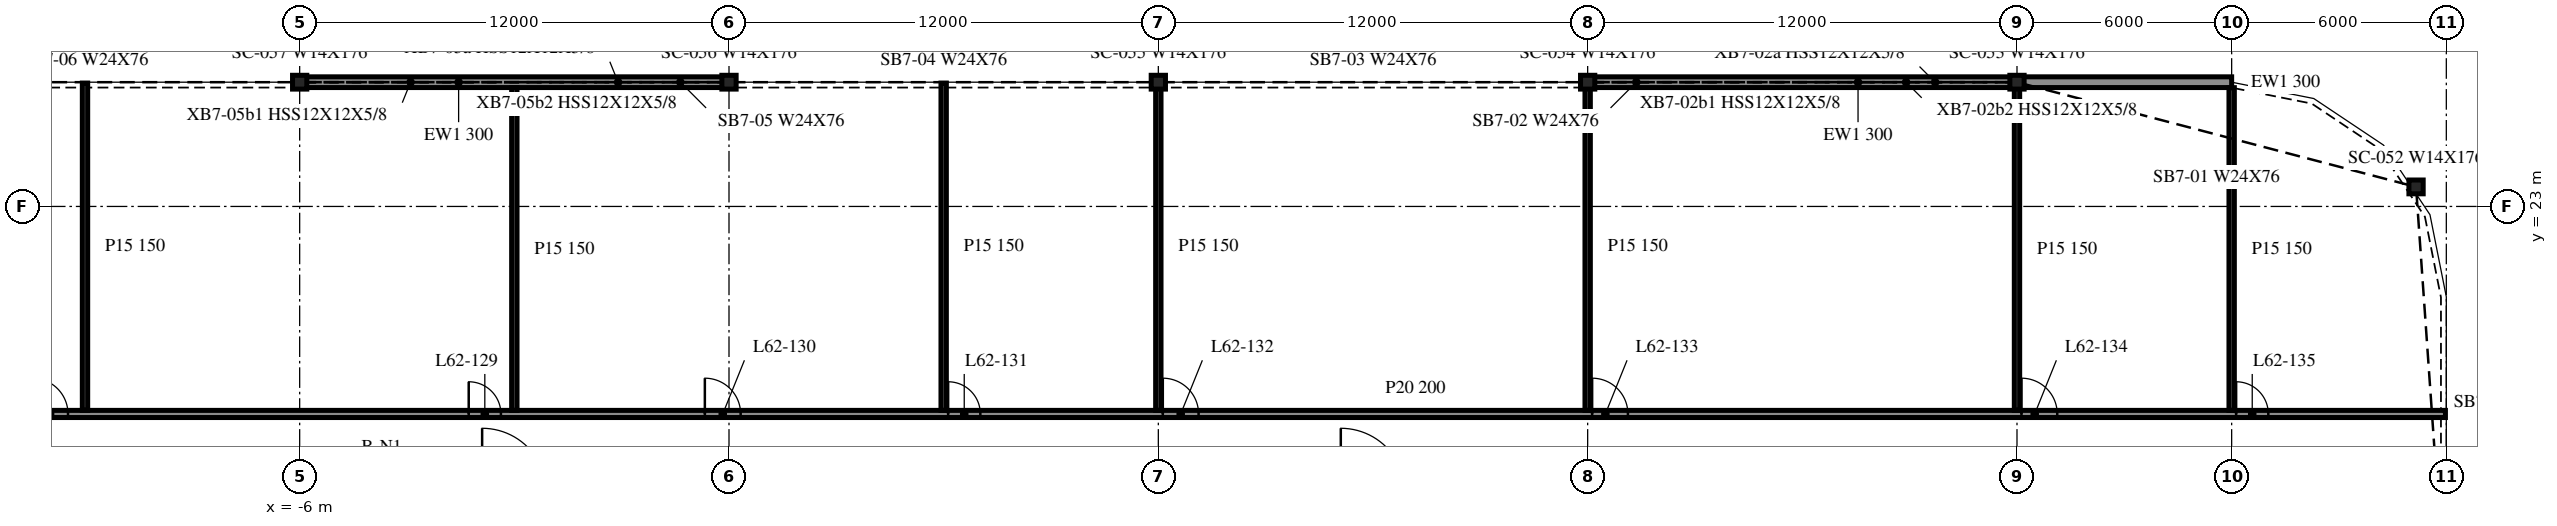
"""IFC4 building model, lengths in metres.
Left out: names, types, materials, properties, quantities, classifications, styles, units other than length and angle.
Written with IfcOpenShell. Run it as: python <this file> out.ifc"""

import sys

from ifc_helpers import new_model, si_unit, direction, frame, frame_2d, origin, origin_2d, place, context, subcontext, project, spatial, rectangle, i_section, extrude, element, fill, save


model = new_model("IFC4")
c1 = context("Model", 3, precision=1e-05, world=origin(), true_north=direction((0.0, 1.0)))
c2 = subcontext(c1, "Body", "Model", "MODEL_VIEW")
j1 = project(units=[si_unit("LENGTHUNIT", "METRE"), si_unit("PLANEANGLEUNIT", "RADIAN")], contexts=[c1])
p1 = place(None, origin())
s1 = spatial("IfcSite", under=j1, at=p1, CompositionType="ELEMENT")
p2 = place(p1, origin())
s2 = spatial("IfcBuilding", under=s1, at=p2, CompositionType="ELEMENT")
p3 = place(p2, frame((0.0, 0.0, 255.2)))
s3 = spatial("IfcBuildingStorey", under=s2, at=p3, CompositionType="ELEMENT", Elevation=255.2)
for number, where, z_axis, x_axis in (
    (1, (53.154, 23.546, -0.34), (0.0, 0.0, 1.0), (1.0, 0.0, 0.0)),
    (2, (42.0, 26.473, -0.34), (0.0, 0.0, 1.0), (1.0, 0.0, 0.0)),
    (3, (30.0, 26.473, -0.34), (0.0, 0.0, 1.0), (1.0, 0.0, 0.0)),
    (4, (18.0, 26.473, -0.34), (0.0, 0.0, 1.0), (1.0, 0.0, 0.0)),
    (5, (6.0, 26.473, -0.34), (0.0, 0.0, 1.0), (1.0, 0.0, 0.0)),
    (6, (-6.0, 26.473, -0.34), (0.0, 0.0, 1.0), (1.0, 0.0, 0.0)),
):
    element("IfcColumn", number, at=place(p3, frame(where, z_axis=z_axis, x_axis=x_axis)), inside=s3, PredefinedType="COLUMN", context=c2, shape_type="SweptSolid", body=[
        extrude(i_section(OverallWidth=0.399, OverallDepth=0.386, WebThickness=0.021, FlangeThickness=0.033, at=origin_2d()), origin(), (0.0, 0.0, 1.0), 3.74),
    ])
p4 = place(p3, frame((48.0, 26.473, 0.0), z_axis=(0.0, 0.0, 1.0), x_axis=(-1.0, 0.0, 0.0)))
e7 = element("IfcWall", 7, at=p4, inside=s3, PredefinedType="NOTDEFINED", context=c2, shape_type="SweptSolid", body=[
    extrude(rectangle(XDim=5.99, YDim=0.3, at=frame_2d((2.995, 0.0))), origin(), (0.0, 0.0, 1.0), 3.4),
])
for number, where, z_axis, x_axis in (
    (8, (41.99, 26.473, 0.0), (0.0, 0.0, 1.0), (-1.0, 0.0, 0.0)),
    (9, (5.99, 26.473, 0.0), (0.0, 0.0, 1.0), (-1.0, 0.0, 0.0)),
):
    element("IfcWall", number, at=place(p3, frame(where, z_axis=z_axis, x_axis=x_axis)), inside=s3, PredefinedType="NOTDEFINED", context=c2, shape_type="SweptSolid", body=[
        extrude(rectangle(XDim=11.979, YDim=0.3, at=frame_2d((5.99, 0.0))), origin(), (0.0, 0.0, 1.0), 3.4),
    ])
p5 = place(p3, frame((-41.975, 17.2, 0.0), z_axis=(0.0, 0.0, 1.0), x_axis=(1.0, 0.0, 0.0)))
e10 = element("IfcWall", 10, at=p5, inside=s3, PredefinedType="PARTITIONING", context=c2, shape_type="SweptSolid", body=[
    extrude(rectangle(XDim=95.95, YDim=0.2, at=frame_2d((47.975, 0.0))), origin(), (0.0, 0.0, 1.0), 3.4),
])
p6 = place(p5, frame((10.5, 0.0, 0.0)))
e11 = element("IfcOpeningElement", 11, at=p6, cuts=e10, PredefinedType="OPENING", context=c2, shape_type="SweptSolid", body=[
    extrude(rectangle(XDim=1.0, YDim=2.1, at=frame_2d((0.5, 1.05))), frame((0.0, 0.11, 0.0), z_axis=(0.0, -1.0, 0.0), x_axis=(1.0, 0.0, 0.0)), (0.0, 0.0, 1.0), 0.22),
])
p7 = place(p5, frame((22.5, 0.0, 0.0)))
e12 = element("IfcOpeningElement", 12, at=p7, cuts=e10, PredefinedType="OPENING", context=c2, shape_type="SweptSolid", body=[
    extrude(rectangle(XDim=1.0, YDim=2.1, at=frame_2d((0.5, 1.05))), frame((0.0, 0.11, 0.0), z_axis=(0.0, -1.0, 0.0), x_axis=(1.0, 0.0, 0.0)), (0.0, 0.0, 1.0), 0.22),
])
p8 = place(p5, frame((28.5, 0.0, 0.0)))
e13 = element("IfcOpeningElement", 13, at=p8, cuts=e10, PredefinedType="OPENING", context=c2, shape_type="SweptSolid", body=[
    extrude(rectangle(XDim=1.0, YDim=2.1, at=frame_2d((0.5, 1.05))), frame((0.0, 0.11, 0.0), z_axis=(0.0, -1.0, 0.0), x_axis=(1.0, 0.0, 0.0)), (0.0, 0.0, 1.0), 0.22),
])
p9 = place(p5, frame((40.7, 0.0, 0.0)))
e14 = element("IfcOpeningElement", 14, at=p9, cuts=e10, PredefinedType="OPENING", context=c2, shape_type="SweptSolid", body=[
    extrude(rectangle(XDim=0.9, YDim=2.1, at=frame_2d((0.45, 1.05))), frame((0.0, 0.11, 0.0), z_axis=(0.0, -1.0, 0.0), x_axis=(1.0, 0.0, 0.0)), (0.0, 0.0, 1.0), 0.22),
])
p10 = place(p5, frame((47.3, 0.0, 0.0)))
e15 = element("IfcOpeningElement", 15, at=p10, cuts=e10, PredefinedType="OPENING", context=c2, shape_type="SweptSolid", body=[
    extrude(rectangle(XDim=1.0, YDim=2.1, at=frame_2d((0.5, 1.05))), frame((0.0, 0.11, 0.0), z_axis=(0.0, -1.0, 0.0), x_axis=(1.0, 0.0, 0.0)), (0.0, 0.0, 1.0), 0.22),
])
p11 = place(p5, frame((54.1, 0.0, 0.0)))
e16 = element("IfcOpeningElement", 16, at=p11, cuts=e10, PredefinedType="OPENING", context=c2, shape_type="SweptSolid", body=[
    extrude(rectangle(XDim=0.9, YDim=2.1, at=frame_2d((0.45, 1.05))), frame((0.0, 0.11, 0.0), z_axis=(0.0, -1.0, 0.0), x_axis=(1.0, 0.0, 0.0)), (0.0, 0.0, 1.0), 0.22),
])
p12 = place(p5, frame((60.1, 0.0, 0.0)))
e17 = element("IfcOpeningElement", 17, at=p12, cuts=e10, PredefinedType="OPENING", context=c2, shape_type="SweptSolid", body=[
    extrude(rectangle(XDim=1.0, YDim=2.1, at=frame_2d((0.5, 1.05))), frame((0.0, 0.11, 0.0), z_axis=(0.0, -1.0, 0.0), x_axis=(1.0, 0.0, 0.0)), (0.0, 0.0, 1.0), 0.22),
])
p13 = place(p5, frame((72.1, 0.0, 0.0)))
e18 = element("IfcOpeningElement", 18, at=p13, cuts=e10, PredefinedType="OPENING", context=c2, shape_type="SweptSolid", body=[
    extrude(rectangle(XDim=1.0, YDim=2.1, at=frame_2d((0.5, 1.05))), frame((0.0, 0.11, 0.0), z_axis=(0.0, -1.0, 0.0), x_axis=(1.0, 0.0, 0.0)), (0.0, 0.0, 1.0), 0.22),
])
p14 = place(p5, frame((84.1, 0.0, 0.0)))
e19 = element("IfcOpeningElement", 19, at=p14, cuts=e10, PredefinedType="OPENING", context=c2, shape_type="SweptSolid", body=[
    extrude(rectangle(XDim=1.0, YDim=2.1, at=frame_2d((0.5, 1.05))), frame((0.0, 0.11, 0.0), z_axis=(0.0, -1.0, 0.0), x_axis=(1.0, 0.0, 0.0)), (0.0, 0.0, 1.0), 0.22),
])
p15 = place(p5, frame((90.1, 0.0, 0.0)))
e20 = element("IfcOpeningElement", 20, at=p15, cuts=e10, PredefinedType="OPENING", context=c2, shape_type="SweptSolid", body=[
    extrude(rectangle(XDim=0.9, YDim=2.1, at=frame_2d((0.45, 1.05))), frame((0.0, 0.11, 0.0), z_axis=(0.0, -1.0, 0.0), x_axis=(1.0, 0.0, 0.0)), (0.0, 0.0, 1.0), 0.22),
])
p16 = place(p3, frame((-12.0, 17.3, 0.0), z_axis=(0.0, 0.0, 1.0), x_axis=(0.0, 1.0, 0.0)))
e21 = element("IfcWall", 21, at=p16, inside=s3, PredefinedType="PARTITIONING", context=c2, shape_type="SweptSolid", body=[
    extrude(rectangle(XDim=9.148, YDim=0.15, at=frame_2d((4.574, 0.0))), origin(), (0.0, 0.0, 1.0), 3.4),
])
p17 = place(p3, frame((0.0, 17.3, 0.0), z_axis=(0.0, 0.0, 1.0), x_axis=(0.0, 1.0, 0.0)))
e22 = element("IfcWall", 22, at=p17, inside=s3, PredefinedType="PARTITIONING", context=c2, shape_type="SweptSolid", body=[
    extrude(rectangle(XDim=9.023, YDim=0.15, at=frame_2d((4.511, 0.0))), origin(), (0.0, 0.0, 1.0), 3.4),
])
p18 = place(p3, frame((12.0, 17.3, 0.0), z_axis=(0.0, 0.0, 1.0), x_axis=(0.0, 1.0, 0.0)))
e23 = element("IfcWall", 23, at=p18, inside=s3, PredefinedType="PARTITIONING", context=c2, shape_type="SweptSolid", body=[
    extrude(rectangle(XDim=9.148, YDim=0.15, at=frame_2d((4.574, 0.0))), origin(), (0.0, 0.0, 1.0), 3.4),
])
for number, where, z_axis, x_axis in (
    (24, (18.0, 17.3, 0.0), (0.0, 0.0, 1.0), (0.0, 1.0, 0.0)),
    (25, (30.0, 17.3, 0.0), (0.0, 0.0, 1.0), (0.0, 1.0, 0.0)),
):
    element("IfcWall", number, at=place(p3, frame(where, z_axis=z_axis, x_axis=x_axis)), inside=s3, PredefinedType="PARTITIONING", context=c2, shape_type="SweptSolid", body=[
        extrude(rectangle(XDim=9.148, YDim=0.15, at=frame_2d((4.574, 0.0))), origin(), (0.0, 0.0, 1.0), 2.401),
    ])
p19 = place(p3, frame((42.0, 17.3, 0.0), z_axis=(0.0, 0.0, 1.0), x_axis=(0.0, 1.0, 0.0)))
e26 = element("IfcWall", 26, at=p19, inside=s3, PredefinedType="PARTITIONING", context=c2, shape_type="SweptSolid", body=[
    extrude(rectangle(XDim=9.023, YDim=0.15, at=frame_2d((4.511, 0.0))), origin(), (0.0, 0.0, 1.0), 2.401),
])
p20 = place(p3, frame((48.0, 17.3, 0.0), z_axis=(0.0, 0.0, 1.0), x_axis=(0.0, 1.0, 0.0)))
e27 = element("IfcWall", 27, at=p20, inside=s3, PredefinedType="PARTITIONING", context=c2, shape_type="SweptSolid", body=[
    extrude(rectangle(XDim=9.02, YDim=0.15, at=frame_2d((4.51, 0.0))), origin(), (0.0, 0.0, 1.0), 3.4),
])
p21 = place(p8, origin())
e28 = element("IfcDoor", 28, at=p21, inside=s3, OperationType="SINGLE_SWING_LEFT", PredefinedType="DOOR", context=c2, shape_type="SweptSolid", body=[
    extrude(rectangle(XDim=1.0, YDim=2.1, at=frame_2d((0.5, 1.05))), frame((0.0, 0.025, 0.0), z_axis=(0.0, -1.0, 0.0), x_axis=(1.0, 0.0, 0.0)), (0.0, 0.0, 1.0), 0.05),
])
fill(e13, e28)
p22 = place(p9, origin())
e29 = element("IfcDoor", 29, at=p22, inside=s3, OperationType="SINGLE_SWING_LEFT", PredefinedType="DOOR", context=c2, shape_type="SweptSolid", body=[
    extrude(rectangle(XDim=0.9, YDim=2.1, at=frame_2d((0.45, 1.05))), frame((0.0, 0.025, 0.0), z_axis=(0.0, -1.0, 0.0), x_axis=(1.0, 0.0, 0.0)), (0.0, 0.0, 1.0), 0.05),
])
fill(e14, e29)
p23 = place(p10, origin())
e30 = element("IfcDoor", 30, at=p23, inside=s3, OperationType="SINGLE_SWING_LEFT", PredefinedType="DOOR", context=c2, shape_type="SweptSolid", body=[
    extrude(rectangle(XDim=1.0, YDim=2.1, at=frame_2d((0.5, 1.05))), frame((0.0, 0.025, 0.0), z_axis=(0.0, -1.0, 0.0), x_axis=(1.0, 0.0, 0.0)), (0.0, 0.0, 1.0), 0.05),
])
fill(e15, e30)
p24 = place(p11, origin())
e31 = element("IfcDoor", 31, at=p24, inside=s3, OperationType="SINGLE_SWING_RIGHT", PredefinedType="DOOR", context=c2, shape_type="SweptSolid", body=[
    extrude(rectangle(XDim=0.9, YDim=2.1, at=frame_2d((0.45, 1.05))), frame((0.0, 0.025, 0.0), z_axis=(0.0, -1.0, 0.0), x_axis=(1.0, 0.0, 0.0)), (0.0, 0.0, 1.0), 0.05),
])
fill(e16, e31)
p25 = place(p12, origin())
e32 = element("IfcDoor", 32, at=p25, inside=s3, OperationType="SINGLE_SWING_RIGHT", PredefinedType="DOOR", context=c2, shape_type="SweptSolid", body=[
    extrude(rectangle(XDim=1.0, YDim=2.1, at=frame_2d((0.5, 1.05))), frame((0.0, 0.025, 0.0), z_axis=(0.0, -1.0, 0.0), x_axis=(1.0, 0.0, 0.0)), (0.0, 0.0, 1.0), 0.05),
])
fill(e17, e32)
p26 = place(p13, origin())
e33 = element("IfcDoor", 33, at=p26, inside=s3, OperationType="SINGLE_SWING_RIGHT", PredefinedType="DOOR", context=c2, shape_type="SweptSolid", body=[
    extrude(rectangle(XDim=1.0, YDim=2.1, at=frame_2d((0.5, 1.05))), frame((0.0, 0.025, 0.0), z_axis=(0.0, -1.0, 0.0), x_axis=(1.0, 0.0, 0.0)), (0.0, 0.0, 1.0), 0.05),
])
fill(e18, e33)
p27 = place(p14, origin())
e34 = element("IfcDoor", 34, at=p27, inside=s3, OperationType="SINGLE_SWING_RIGHT", PredefinedType="DOOR", context=c2, shape_type="SweptSolid", body=[
    extrude(rectangle(XDim=1.0, YDim=2.1, at=frame_2d((0.5, 1.05))), frame((0.0, 0.025, 0.0), z_axis=(0.0, -1.0, 0.0), x_axis=(1.0, 0.0, 0.0)), (0.0, 0.0, 1.0), 0.05),
])
fill(e19, e34)
p28 = place(p15, origin())
e35 = element("IfcDoor", 35, at=p28, inside=s3, OperationType="SINGLE_SWING_RIGHT", PredefinedType="DOOR", context=c2, shape_type="SweptSolid", body=[
    extrude(rectangle(XDim=0.9, YDim=2.1, at=frame_2d((0.45, 1.05))), frame((0.0, 0.025, 0.0), z_axis=(0.0, -1.0, 0.0), x_axis=(1.0, 0.0, 0.0)), (0.0, 0.0, 1.0), 0.05),
])
fill(e20, e35)
save(model, sys.argv[1])
